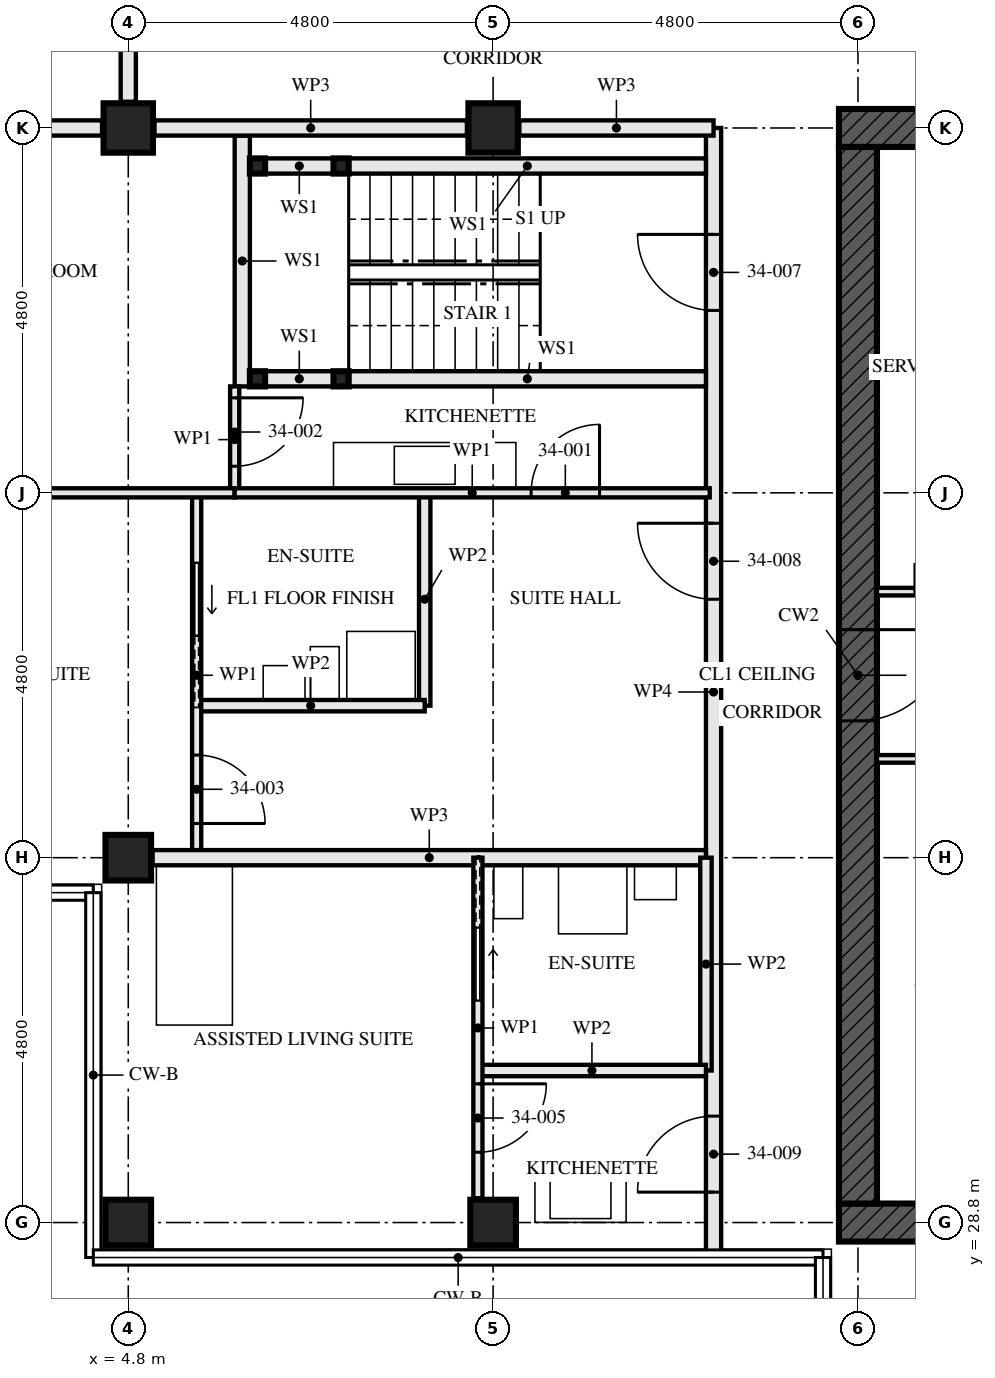
"""IFC4 building model, lengths in metres.
Left out: names, types, materials, properties, quantities, classifications, styles, units other than length and angle.
Written with IfcOpenShell. Run it as: python <this file> out.ifc"""

import sys

from ifc_helpers import new_model, si_unit, direction, frame, frame_2d, origin, origin_2d, place, context, subcontext, project, spatial, rectangle, hollow_rectangle, extrude, element, fill, save


model = new_model("IFC4")
c1 = context("Model", 3, precision=1e-05, world=origin(), true_north=direction((0.0, 1.0)))
c2 = subcontext(c1, "Body", "Model", "MODEL_VIEW")
j1 = project(units=[si_unit("LENGTHUNIT", "METRE"), si_unit("PLANEANGLEUNIT", "RADIAN")], contexts=[c1])
p1 = place(None, origin())
s1 = spatial("IfcSite", under=j1, at=p1, CompositionType="ELEMENT")
p2 = place(p1, origin())
s2 = spatial("IfcBuilding", under=s1, at=p2, CompositionType="ELEMENT")
p3 = place(p2, frame((0.0, 0.0, 126.0)))
s3 = spatial("IfcBuildingStorey", under=s2, at=p3, CompositionType="ELEMENT", Elevation=126.0)
for number, where, z_axis, x_axis in (
    (1, (4.8, 28.8, 0.0), (0.0, 0.0, 1.0), (0.0, 1.0, 0.0)),
    (2, (4.8, 33.6, 0.0), (0.0, 0.0, 1.0), (0.0, 1.0, 0.0)),
):
    element("IfcColumn", number, at=place(p3, frame(where, z_axis=z_axis, x_axis=x_axis)), inside=s3, PredefinedType="COLUMN", context=c2, shape_type="SweptSolid", body=[
        extrude(hollow_rectangle(XDim=0.6, YDim=0.6, WallThickness=0.08, at=origin_2d()), origin(), (0.0, 0.0, 1.0), 3.5),
    ])
p4 = place(p3, frame((4.8, 43.2, 0.0), z_axis=(0.0, 0.0, 1.0), x_axis=(0.0, 1.0, 0.0)))
e3 = element("IfcColumn", 3, at=p4, inside=s3, PredefinedType="COLUMN", context=c2, shape_type="SweptSolid", body=[
    extrude(hollow_rectangle(XDim=0.65, YDim=0.65, WallThickness=0.05, at=origin_2d()), origin(), (0.0, 0.0, 1.0), 3.5),
])
p5 = place(p3, frame((9.6, 28.8, 0.0), z_axis=(0.0, 0.0, 1.0), x_axis=(0.0, 1.0, 0.0)))
e4 = element("IfcColumn", 4, at=p5, inside=s3, PredefinedType="COLUMN", context=c2, shape_type="SweptSolid", body=[
    extrude(hollow_rectangle(XDim=0.6, YDim=0.6, WallThickness=0.08, at=origin_2d()), origin(), (0.0, 0.0, 1.0), 3.5),
])
p6 = place(p3, frame((9.6, 43.2, 0.0), z_axis=(0.0, 0.0, 1.0), x_axis=(0.0, 1.0, 0.0)))
e5 = element("IfcColumn", 5, at=p6, inside=s3, PredefinedType="COLUMN", context=c2, shape_type="SweptSolid", body=[
    extrude(hollow_rectangle(XDim=0.65, YDim=0.65, WallThickness=0.05, at=origin_2d()), origin(), (0.0, 0.0, 1.0), 3.5),
])
p7 = place(p3, frame((14.15, 28.8, -0.17), z_axis=(0.0, 0.0, 1.0), x_axis=(1.0, 0.0, 0.0)))
e6 = element("IfcWall", 6, at=p7, inside=s3, PredefinedType="SHEAR", context=c2, shape_type="SweptSolid", body=[
    extrude(rectangle(XDim=14.9, YDim=0.5, at=frame_2d((7.45, 0.0))), origin(), (0.0, 0.0, 1.0), 3.5),
])
p8 = place(p7, frame((6.85, 0.0, 0.17)))
e7 = element("IfcOpeningElement", 7, at=p8, cuts=e6, PredefinedType="OPENING", context=c2, shape_type="SweptSolid", body=[
    extrude(rectangle(XDim=1.2, YDim=2.1, at=frame_2d((0.6, 1.05))), frame((0.0, 0.26, 0.0), z_axis=(0.0, -1.0, 0.0), x_axis=(1.0, 0.0, 0.0)), (0.0, 0.0, 1.0), 0.521),
])
p9 = place(p3, frame((29.05, 43.2, -0.17), z_axis=(0.0, 0.0, 1.0), x_axis=(-1.0, 0.0, 0.0)))
e8 = element("IfcWall", 8, at=p9, inside=s3, PredefinedType="SHEAR", context=c2, shape_type="SweptSolid", body=[
    extrude(rectangle(XDim=14.9, YDim=0.5, at=frame_2d((7.45, 0.0))), origin(), (0.0, 0.0, 1.0), 3.5),
])
p10 = place(p9, frame((6.85, 0.0, 0.17)))
e9 = element("IfcOpeningElement", 9, at=p10, cuts=e8, PredefinedType="OPENING", context=c2, shape_type="SweptSolid", body=[
    extrude(rectangle(XDim=1.2, YDim=2.1, at=frame_2d((0.6, 1.05))), frame((0.0, 0.26, 0.0), z_axis=(0.0, -1.0, 0.0), x_axis=(1.0, 0.0, 0.0)), (0.0, 0.0, 1.0), 0.521),
])
p11 = place(p3, frame((14.4, 42.95, -0.17), z_axis=(0.0, 0.0, 1.0), x_axis=(0.0, -1.0, 0.0)))
e10 = element("IfcWall", 10, at=p11, inside=s3, PredefinedType="SHEAR", context=c2, shape_type="SweptSolid", body=[
    extrude(rectangle(XDim=13.9, YDim=0.5, at=frame_2d((6.95, 0.0))), origin(), (0.0, 0.0, 1.0), 3.5),
])
p12 = place(p11, frame((6.35, 0.0, 0.17)))
e11 = element("IfcOpeningElement", 11, at=p12, cuts=e10, PredefinedType="OPENING", context=c2, shape_type="SweptSolid", body=[
    extrude(rectangle(XDim=1.2, YDim=2.1, at=frame_2d((0.6, 1.05))), frame((0.0, 0.26, 0.0), z_axis=(0.0, -1.0, 0.0), x_axis=(1.0, 0.0, 0.0)), (0.0, 0.0, 1.0), 0.521),
])
for number, where, z_axis, x_axis in (
    (12, (6.5, 42.7, 0.0), (0.0, 0.0, 1.0), (1.0, 0.0, 0.0)),
    (13, (6.5, 39.9, 0.0), (0.0, 0.0, 1.0), (1.0, 0.0, 0.0)),
    (14, (7.6, 42.7, 0.0), (0.0, 0.0, 1.0), (1.0, 0.0, 0.0)),
    (15, (7.6, 39.9, 0.0), (0.0, 0.0, 1.0), (1.0, 0.0, 0.0)),
):
    element("IfcColumn", number, at=place(p3, frame(where, z_axis=z_axis, x_axis=x_axis)), inside=s3, PredefinedType="COLUMN", context=c2, shape_type="SweptSolid", body=[
        extrude(hollow_rectangle(XDim=0.2, YDim=0.2, WallThickness=0.008, at=origin_2d()), origin(), (0.0, 0.0, 1.0), 3.33),
    ])
p13 = place(p3, frame((6.6, 42.7, 0.0), z_axis=(0.0, 0.0, 1.0), x_axis=(1.0, 0.0, 0.0)))
e16 = element("IfcWall", 16, at=p13, inside=s3, PredefinedType="SOLIDWALL", context=c2, shape_type="SweptSolid", body=[
    extrude(rectangle(XDim=0.9, YDim=0.2, at=frame_2d((0.45, 0.0))), origin(), (0.0, 0.0, 1.0), 2.99),
])
p14 = place(p3, frame((7.7, 42.7, 0.0), z_axis=(0.0, 0.0, 1.0), x_axis=(1.0, 0.0, 0.0)))
e17 = element("IfcWall", 17, at=p14, inside=s3, PredefinedType="SOLIDWALL", context=c2, shape_type="SweptSolid", body=[
    extrude(rectangle(XDim=4.7, YDim=0.2, at=frame_2d((2.35, 0.0))), origin(), (0.0, 0.0, 1.0), 2.99),
])
p15 = place(p3, frame((6.6, 39.9, 0.0), z_axis=(0.0, 0.0, 1.0), x_axis=(1.0, 0.0, 0.0)))
e18 = element("IfcWall", 18, at=p15, inside=s3, PredefinedType="SOLIDWALL", context=c2, shape_type="SweptSolid", body=[
    extrude(rectangle(XDim=0.9, YDim=0.2, at=frame_2d((0.45, 0.0))), origin(), (0.0, 0.0, 1.0), 2.99),
])
p16 = place(p3, frame((7.7, 39.9, 0.0), z_axis=(0.0, 0.0, 1.0), x_axis=(1.0, 0.0, 0.0)))
e19 = element("IfcWall", 19, at=p16, inside=s3, PredefinedType="SOLIDWALL", context=c2, shape_type="SweptSolid", body=[
    extrude(rectangle(XDim=4.7, YDim=0.2, at=frame_2d((2.35, 0.0))), origin(), (0.0, 0.0, 1.0), 2.99),
])
p17 = place(p3, frame((6.3, 43.1, 0.0), z_axis=(0.0, 0.0, 1.0), x_axis=(0.0, -1.0, 0.0)))
e20 = element("IfcWall", 20, at=p17, inside=s3, PredefinedType="SOLIDWALL", context=c2, shape_type="SweptSolid", body=[
    extrude(rectangle(XDim=3.3, YDim=0.2, at=frame_2d((1.65, 0.0))), origin(), (0.0, 0.0, 1.0), 3.33),
])
p18 = place(p3, frame((5.7, 35.6, 0.0), z_axis=(0.0, 0.0, 1.0), x_axis=(1.0, 0.0, 0.0)))
e21 = element("IfcWall", 21, at=p18, inside=s3, PredefinedType="PARTITIONING", context=c2, shape_type="SweptSolid", body=[
    extrude(rectangle(XDim=3.0, YDim=0.15, at=frame_2d((1.5, 0.0))), origin(), (0.0, 0.0, 1.0), 3.33),
])
p19 = place(p3, frame((8.7, 38.4, 0.0), z_axis=(0.0, 0.0, 1.0), x_axis=(0.0, -1.0, 0.0)))
e22 = element("IfcWall", 22, at=p19, inside=s3, PredefinedType="PARTITIONING", context=c2, shape_type="SweptSolid", body=[
    extrude(rectangle(XDim=2.8, YDim=0.15, at=frame_2d((1.4, 0.0))), origin(), (0.0, 0.0, 1.0), 3.33),
])
p20 = place(p3, frame((6.2, 38.4, 0.0), z_axis=(0.0, 0.0, 1.0), x_axis=(1.0, 0.0, 0.0)))
e23 = element("IfcWall", 23, at=p20, inside=s3, PredefinedType="PARTITIONING", context=c2, shape_type="SweptSolid", body=[
    extrude(rectangle(XDim=6.25, YDim=0.12, at=frame_2d((3.125, 0.0))), origin(), (0.0, 0.0, 1.0), 2.55),
])
p21 = place(p20, frame((3.9, 0.0, 0.0)))
e24 = element("IfcOpeningElement", 24, at=p21, cuts=e23, PredefinedType="OPENING", context=c2, shape_type="SweptSolid", body=[
    extrude(rectangle(XDim=0.9, YDim=2.1, at=frame_2d((0.45, 1.05))), frame((0.0, 0.071, 0.0), z_axis=(0.0, -1.0, 0.0), x_axis=(1.0, 0.0, 0.0)), (0.0, 0.0, 1.0), 0.141),
])
p22 = place(p3, frame((6.2, 39.8, 0.0), z_axis=(0.0, 0.0, 1.0), x_axis=(0.0, -1.0, 0.0)))
e25 = element("IfcWall", 25, at=p22, inside=s3, PredefinedType="PARTITIONING", context=c2, shape_type="SweptSolid", body=[
    extrude(rectangle(XDim=1.4, YDim=0.12, at=frame_2d((0.7, 0.0))), origin(), (0.0, 0.0, 1.0), 3.33),
])
p23 = place(p22, frame((0.15, 0.0, 0.0)))
e26 = element("IfcOpeningElement", 26, at=p23, cuts=e25, PredefinedType="OPENING", context=c2, shape_type="SweptSolid", body=[
    extrude(rectangle(XDim=0.9, YDim=2.1, at=frame_2d((0.45, 1.05))), frame((0.0, 0.071, 0.0), z_axis=(0.0, -1.0, 0.0), x_axis=(1.0, 0.0, 0.0)), (0.0, 0.0, 1.0), 0.141),
])
p24 = place(p3, frame((5.7, 38.4, 0.0), z_axis=(0.0, 0.0, 1.0), x_axis=(0.0, -1.0, 0.0)))
e27 = element("IfcWall", 27, at=p24, inside=s3, PredefinedType="PARTITIONING", context=c2, shape_type="SweptSolid", body=[
    extrude(rectangle(XDim=4.8, YDim=0.12, at=frame_2d((2.4, 0.0))), origin(), (0.0, 0.0, 1.0), 3.33),
])
p25 = place(p24, frame((3.45, 0.0, 0.0)))
e28 = element("IfcOpeningElement", 28, at=p25, cuts=e27, PredefinedType="OPENING", context=c2, shape_type="SweptSolid", body=[
    extrude(rectangle(XDim=0.9, YDim=2.1, at=frame_2d((0.45, 1.05))), frame((0.0, 0.071, 0.0), z_axis=(0.0, -1.0, 0.0), x_axis=(1.0, 0.0, 0.0)), (0.0, 0.0, 1.0), 0.141),
])
p26 = place(p24, frame((0.925, 0.0, 0.0)))
e29 = element("IfcOpeningElement", 29, at=p26, cuts=e27, PredefinedType="OPENING", context=c2, shape_type="SweptSolid", body=[
    extrude(rectangle(XDim=0.95, YDim=2.1, at=frame_2d((0.475, 1.05))), frame((0.0, 0.071, 0.0), z_axis=(0.0, -1.0, 0.0), x_axis=(1.0, 0.0, 0.0)), (0.0, 0.0, 1.0), 0.141),
])
p27 = place(p3, frame((0.32, 38.4, 0.0), z_axis=(0.0, 0.0, 1.0), x_axis=(1.0, 0.0, 0.0)))
e30 = element("IfcWall", 30, at=p27, inside=s3, PredefinedType="PARTITIONING", context=c2, shape_type="SweptSolid", body=[
    extrude(rectangle(XDim=5.88, YDim=0.12, at=frame_2d((2.94, 0.0))), origin(), (0.0, 0.0, 1.0), 2.55),
])
p28 = place(p3, frame((5.12, 33.6, 0.0), z_axis=(0.0, 0.0, 1.0), x_axis=(1.0, 0.0, 0.0)))
e31 = element("IfcWall", 31, at=p28, inside=s3, PredefinedType="PARTITIONING", context=c2, shape_type="SweptSolid", body=[
    extrude(rectangle(XDim=7.28, YDim=0.2, at=frame_2d((3.64, 0.0))), origin(), (0.0, 0.0, 1.0), 2.55),
])
p29 = place(p3, frame((9.4, 30.8, 0.0), z_axis=(0.0, 0.0, 1.0), x_axis=(1.0, 0.0, 0.0)))
e32 = element("IfcWall", 32, at=p29, inside=s3, PredefinedType="PARTITIONING", context=c2, shape_type="SweptSolid", body=[
    extrude(rectangle(XDim=3.0, YDim=0.15, at=frame_2d((1.5, 0.0))), origin(), (0.0, 0.0, 1.0), 3.33),
])
p30 = place(p3, frame((12.4, 33.6, 0.0), z_axis=(0.0, 0.0, 1.0), x_axis=(0.0, -1.0, 0.0)))
e33 = element("IfcWall", 33, at=p30, inside=s3, PredefinedType="PARTITIONING", context=c2, shape_type="SweptSolid", body=[
    extrude(rectangle(XDim=2.8, YDim=0.15, at=frame_2d((1.4, 0.0))), origin(), (0.0, 0.0, 1.0), 3.33),
])
p31 = place(p3, frame((9.4, 33.6, 0.0), z_axis=(0.0, 0.0, 1.0), x_axis=(0.0, -1.0, 0.0)))
e34 = element("IfcWall", 34, at=p31, inside=s3, PredefinedType="PARTITIONING", context=c2, shape_type="SweptSolid", body=[
    extrude(rectangle(XDim=4.48, YDim=0.12, at=frame_2d((2.24, 0.0))), origin(), (0.0, 0.0, 1.0), 3.33),
])
p32 = place(p31, frame((2.975, 0.0, 0.0)))
e35 = element("IfcOpeningElement", 35, at=p32, cuts=e34, PredefinedType="OPENING", context=c2, shape_type="SweptSolid", body=[
    extrude(rectangle(XDim=0.9, YDim=2.1, at=frame_2d((0.45, 1.05))), frame((0.0, 0.071, 0.0), z_axis=(0.0, -1.0, 0.0), x_axis=(1.0, 0.0, 0.0)), (0.0, 0.0, 1.0), 0.141),
])
p33 = place(p31, frame((0.925, 0.0, 0.0)))
e36 = element("IfcOpeningElement", 36, at=p33, cuts=e34, PredefinedType="OPENING", context=c2, shape_type="SweptSolid", body=[
    extrude(rectangle(XDim=0.95, YDim=2.1, at=frame_2d((0.475, 1.05))), frame((0.0, 0.071, 0.0), z_axis=(0.0, -1.0, 0.0), x_axis=(1.0, 0.0, 0.0)), (0.0, 0.0, 1.0), 0.141),
])
p34 = place(p3, frame((12.5, 43.2, 0.0), z_axis=(0.0, 0.0, 1.0), x_axis=(0.0, -1.0, 0.0)))
e37 = element("IfcWall", 37, at=p34, inside=s3, PredefinedType="PARTITIONING", context=c2, shape_type="SweptSolid", body=[
    extrude(rectangle(XDim=14.84, YDim=0.2, at=frame_2d((7.42, 0.0))), origin(), (0.0, 0.0, 1.0), 2.32),
])
p35 = place(p34, frame((1.4, 0.0, 0.0)))
e38 = element("IfcOpeningElement", 38, at=p35, cuts=e37, PredefinedType="OPENING", context=c2, shape_type="SweptSolid", body=[
    extrude(rectangle(XDim=1.0, YDim=2.1, at=frame_2d((0.5, 1.05))), frame((0.0, 0.111, 0.0), z_axis=(0.0, -1.0, 0.0), x_axis=(1.0, 0.0, 0.0)), (0.0, 0.0, 1.0), 0.221),
])
p36 = place(p34, frame((5.2, 0.0, 0.0)))
e39 = element("IfcOpeningElement", 39, at=p36, cuts=e37, PredefinedType="OPENING", context=c2, shape_type="SweptSolid", body=[
    extrude(rectangle(XDim=1.0, YDim=2.1, at=frame_2d((0.5, 1.05))), frame((0.0, 0.111, 0.0), z_axis=(0.0, -1.0, 0.0), x_axis=(1.0, 0.0, 0.0)), (0.0, 0.0, 1.0), 0.221),
])
p37 = place(p34, frame((13.0, 0.0, 0.0)))
e40 = element("IfcOpeningElement", 40, at=p37, cuts=e37, PredefinedType="OPENING", context=c2, shape_type="SweptSolid", body=[
    extrude(rectangle(XDim=1.0, YDim=2.1, at=frame_2d((0.5, 1.05))), frame((0.0, 0.111, 0.0), z_axis=(0.0, -1.0, 0.0), x_axis=(1.0, 0.0, 0.0)), (0.0, 0.0, 1.0), 0.221),
])
p38 = place(p3, frame((4.8, 45.2, 0.0), z_axis=(0.0, 0.0, 1.0), x_axis=(0.0, -1.0, 0.0)))
e41 = element("IfcWall", 41, at=p38, inside=s3, PredefinedType="PARTITIONING", context=c2, shape_type="SweptSolid", body=[
    extrude(rectangle(XDim=1.655, YDim=0.2, at=frame_2d((0.828, 0.0))), origin(), (0.0, 0.0, 1.0), 3.33),
])
p39 = place(p3, frame((14.65, 34.9, 0.0), z_axis=(0.0, 0.0, 1.0), x_axis=(1.0, 0.0, 0.0)))
e42 = element("IfcWall", 42, at=p39, inside=s3, PredefinedType="SOLIDWALL", context=c2, shape_type="SweptSolid", body=[
    extrude(rectangle(XDim=5.9, YDim=0.1, at=frame_2d((2.95, 0.0))), origin(), (0.0, 0.0, 1.0), 3.33),
])
p40 = place(p39, frame((1.6, 0.0, 0.0)))
e43 = element("IfcOpeningElement", 43, at=p40, cuts=e42, PredefinedType="OPENING", context=c2, shape_type="SweptSolid", body=[
    extrude(rectangle(XDim=0.7, YDim=2.1, at=frame_2d((0.35, 1.05))), frame((0.0, 0.061, 0.0), z_axis=(0.0, -1.0, 0.0), x_axis=(1.0, 0.0, 0.0)), (0.0, 0.0, 1.0), 0.121),
])
p41 = place(p3, frame((14.65, 37.1, 0.0), z_axis=(0.0, 0.0, 1.0), x_axis=(1.0, 0.0, 0.0)))
e44 = element("IfcWall", 44, at=p41, inside=s3, PredefinedType="SOLIDWALL", context=c2, shape_type="SweptSolid", body=[
    extrude(rectangle(XDim=5.9, YDim=0.1, at=frame_2d((2.95, 0.0))), origin(), (0.0, 0.0, 1.0), 3.33),
])
p42 = place(p41, frame((0.5, 0.0, 0.0)))
e45 = element("IfcOpeningElement", 45, at=p42, cuts=e44, PredefinedType="OPENING", context=c2, shape_type="SweptSolid", body=[
    extrude(rectangle(XDim=0.7, YDim=2.1, at=frame_2d((0.35, 1.05))), frame((0.0, 0.061, 0.0), z_axis=(0.0, -1.0, 0.0), x_axis=(1.0, 0.0, 0.0)), (0.0, 0.0, 1.0), 0.121),
])
p43 = place(p41, frame((1.9, 0.0, 0.0)))
e46 = element("IfcOpeningElement", 46, at=p43, cuts=e44, PredefinedType="OPENING", context=c2, shape_type="SweptSolid", body=[
    extrude(rectangle(XDim=0.9, YDim=2.1, at=frame_2d((0.45, 1.05))), frame((0.0, 0.061, 0.0), z_axis=(0.0, -1.0, 0.0), x_axis=(1.0, 0.0, 0.0)), (0.0, 0.0, 1.0), 0.121),
])
p44 = place(p3, frame((12.5, 43.2, 0.0), z_axis=(0.0, 0.0, 1.0), x_axis=(-1.0, 0.0, 0.0)))
e47 = element("IfcWall", 47, at=p44, inside=s3, PredefinedType="PARTITIONING", context=c2, shape_type="SweptSolid", body=[
    extrude(rectangle(XDim=2.555, YDim=0.2, at=frame_2d((1.277, 0.0))), origin(), (0.0, 0.0, 1.0), 2.32),
])
p45 = place(p3, frame((9.255, 43.2, 0.0), z_axis=(0.0, 0.0, 1.0), x_axis=(-1.0, 0.0, 0.0)))
e48 = element("IfcWall", 48, at=p45, inside=s3, PredefinedType="PARTITIONING", context=c2, shape_type="SweptSolid", body=[
    extrude(rectangle(XDim=4.11, YDim=0.2, at=frame_2d((2.055, 0.0))), origin(), (0.0, 0.0, 1.0), 2.32),
])
p46 = place(p3, frame((4.455, 43.2, 0.0), z_axis=(0.0, 0.0, 1.0), x_axis=(-1.0, 0.0, 0.0)))
e49 = element("IfcWall", 49, at=p46, inside=s3, PredefinedType="PARTITIONING", context=c2, shape_type="SweptSolid", body=[
    extrude(rectangle(XDim=4.135, YDim=0.2, at=frame_2d((2.067, 0.0))), origin(), (0.0, 0.0, 1.0), 2.32),
])
p47 = place(p21, origin())
e50 = element("IfcDoor", 50, at=p47, inside=s3, OperationType="SINGLE_SWING_LEFT", PredefinedType="DOOR", context=c2, shape_type="SweptSolid", body=[
    extrude(rectangle(XDim=0.9, YDim=2.1, at=frame_2d((0.45, 1.05))), frame((0.0, 0.022, 0.0), z_axis=(0.0, -1.0, 0.0), x_axis=(1.0, 0.0, 0.0)), (0.0, 0.0, 1.0), 0.044),
])
fill(e24, e50)
p48 = place(p23, origin())
e51 = element("IfcDoor", 51, at=p48, inside=s3, OperationType="SINGLE_SWING_RIGHT", PredefinedType="DOOR", context=c2, shape_type="SweptSolid", body=[
    extrude(rectangle(XDim=0.9, YDim=2.1, at=frame_2d((0.45, 1.05))), frame((0.0, 0.022, 0.0), z_axis=(0.0, -1.0, 0.0), x_axis=(1.0, 0.0, 0.0)), (0.0, 0.0, 1.0), 0.044),
])
fill(e26, e51)
p49 = place(p25, origin())
e52 = element("IfcDoor", 52, at=p49, inside=s3, OperationType="SINGLE_SWING_LEFT", PredefinedType="DOOR", context=c2, shape_type="SweptSolid", body=[
    extrude(rectangle(XDim=0.9, YDim=2.1, at=frame_2d((0.45, 1.05))), frame((0.0, 0.022, 0.0), z_axis=(0.0, -1.0, 0.0), x_axis=(1.0, 0.0, 0.0)), (0.0, 0.0, 1.0), 0.044),
])
fill(e28, e52)
p50 = place(p26, origin())
e53 = element("IfcDoor", 53, at=p50, inside=s3, OperationType="SLIDING_TO_LEFT", PredefinedType="DOOR", context=c2, shape_type="SweptSolid", body=[
    extrude(rectangle(XDim=0.95, YDim=2.1, at=frame_2d((0.475, 1.05))), frame((0.0, 0.022, 0.0), z_axis=(0.0, -1.0, 0.0), x_axis=(1.0, 0.0, 0.0)), (0.0, 0.0, 1.0), 0.044),
])
fill(e29, e53)
p51 = place(p32, origin())
e54 = element("IfcDoor", 54, at=p51, inside=s3, OperationType="SINGLE_SWING_RIGHT", PredefinedType="DOOR", context=c2, shape_type="SweptSolid", body=[
    extrude(rectangle(XDim=0.9, YDim=2.1, at=frame_2d((0.45, 1.05))), frame((0.0, 0.022, 0.0), z_axis=(0.0, -1.0, 0.0), x_axis=(1.0, 0.0, 0.0)), (0.0, 0.0, 1.0), 0.044),
])
fill(e35, e54)
p52 = place(p33, origin())
e55 = element("IfcDoor", 55, at=p52, inside=s3, OperationType="SLIDING_TO_RIGHT", PredefinedType="DOOR", context=c2, shape_type="SweptSolid", body=[
    extrude(rectangle(XDim=0.95, YDim=2.1, at=frame_2d((0.475, 1.05))), frame((0.0, 0.022, 0.0), z_axis=(0.0, -1.0, 0.0), x_axis=(1.0, 0.0, 0.0)), (0.0, 0.0, 1.0), 0.044),
])
fill(e36, e55)
p53 = place(p35, frame((1.0, 0.0, 0.0), z_axis=(0.0, 0.0, 1.0), x_axis=(-1.0, 0.0, 0.0)))
e56 = element("IfcDoor", 56, at=p53, inside=s3, OperationType="SINGLE_SWING_LEFT", PredefinedType="DOOR", context=c2, shape_type="SweptSolid", body=[
    extrude(rectangle(XDim=1.0, YDim=2.1, at=frame_2d((0.5, 1.05))), frame((0.0, 0.032, 0.0), z_axis=(0.0, -1.0, 0.0), x_axis=(1.0, 0.0, 0.0)), (0.0, 0.0, 1.0), 0.064),
])
fill(e38, e56)
p54 = place(p36, frame((1.0, 0.0, 0.0), z_axis=(0.0, 0.0, 1.0), x_axis=(-1.0, 0.0, 0.0)))
e57 = element("IfcDoor", 57, at=p54, inside=s3, OperationType="SINGLE_SWING_LEFT", PredefinedType="DOOR", context=c2, shape_type="SweptSolid", body=[
    extrude(rectangle(XDim=1.0, YDim=2.1, at=frame_2d((0.5, 1.05))), frame((0.0, 0.027, 0.0), z_axis=(0.0, -1.0, 0.0), x_axis=(1.0, 0.0, 0.0)), (0.0, 0.0, 1.0), 0.054),
])
fill(e39, e57)
p55 = place(p37, frame((1.0, 0.0, 0.0), z_axis=(0.0, 0.0, 1.0), x_axis=(-1.0, 0.0, 0.0)))
e58 = element("IfcDoor", 58, at=p55, inside=s3, OperationType="SINGLE_SWING_RIGHT", PredefinedType="DOOR", context=c2, shape_type="SweptSolid", body=[
    extrude(rectangle(XDim=1.0, YDim=2.1, at=frame_2d((0.5, 1.05))), frame((0.0, 0.027, 0.0), z_axis=(0.0, -1.0, 0.0), x_axis=(1.0, 0.0, 0.0)), (0.0, 0.0, 1.0), 0.054),
])
fill(e40, e58)
p56 = place(p12, origin())
e59 = element("IfcDoor", 59, at=p56, inside=s3, OperationType="SINGLE_SWING_LEFT", PredefinedType="DOOR", context=c2, shape_type="SweptSolid", body=[
    extrude(rectangle(XDim=1.2, YDim=2.1, at=frame_2d((0.6, 1.05))), frame((0.0, 0.027, 0.0), z_axis=(0.0, -1.0, 0.0), x_axis=(1.0, 0.0, 0.0)), (0.0, 0.0, 1.0), 0.054),
])
fill(e11, e59)
save(model, sys.argv[1])
